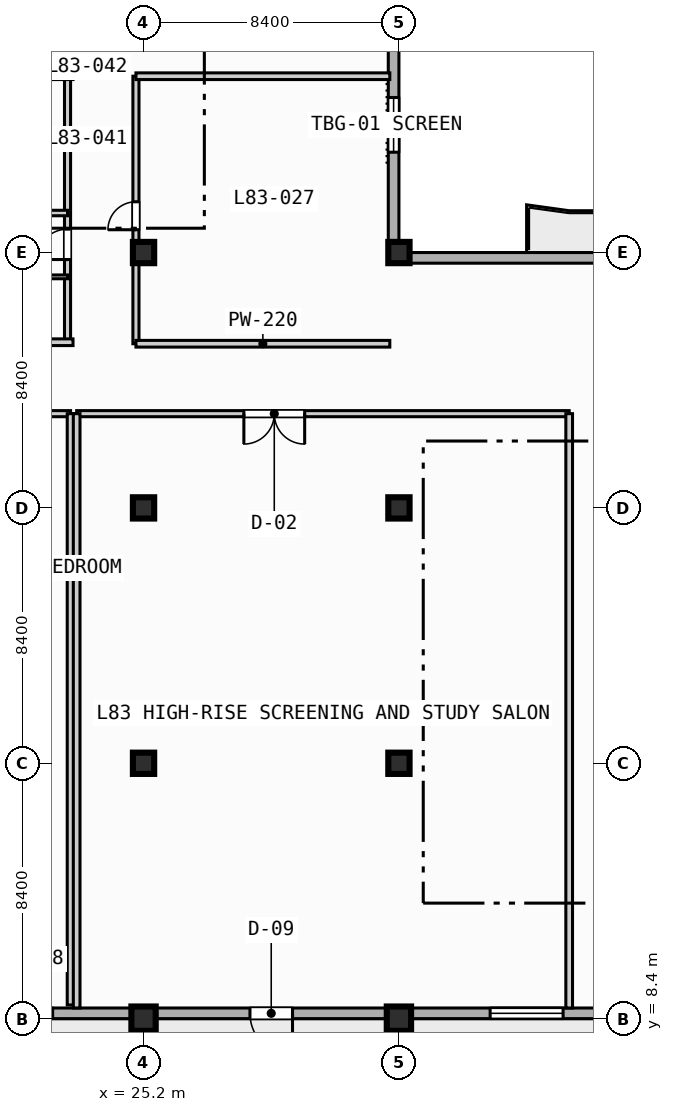
"""IFC4 building model, lengths in metres.
Left out: names, types, materials, properties, quantities, classifications, styles, units other than length and angle.
Written with IfcOpenShell. Run it as: python <this file> out.ifc"""

import sys

from ifc_helpers import new_model, si_unit, direction, frame, frame_2d, origin, origin_2d, place, context, subcontext, project, spatial, rectangle, extrude, element, fill, save


model = new_model("IFC4")
c1 = context("Model", 3, precision=1e-05, world=origin(), true_north=direction((0.0, 1.0)))
c2 = subcontext(c1, "Body", "Model", "MODEL_VIEW")
j1 = project(units=[si_unit("LENGTHUNIT", "METRE"), si_unit("PLANEANGLEUNIT", "RADIAN")], contexts=[c1])
p1 = place(None, origin())
s1 = spatial("IfcSite", under=j1, at=p1, CompositionType="ELEMENT")
p2 = place(p1, origin())
s2 = spatial("IfcBuilding", under=s1, at=p2, CompositionType="ELEMENT")
p3 = place(p2, frame((0.0, 0.0, 335.9)))
s3 = spatial("IfcBuildingStorey", under=s2, at=p3, CompositionType="ELEMENT", Elevation=335.9)
p4 = place(p3, frame((25.2, 8.4, 0.0), z_axis=(0.0, 0.0, 1.0), x_axis=(1.0, 0.0, 0.0)))
e1 = element("IfcColumn", 1, at=p4, inside=s3, PredefinedType="COLUMN", context=c2, shape_type="SweptSolid", body=[
    extrude(rectangle(XDim=0.8, YDim=0.8, at=origin_2d()), origin(), (0.0, 0.0, 1.0), 3.9),
])
for number, where, z_axis, x_axis in (
    (2, (25.2, 16.8, 0.0), (0.0, 0.0, 1.0), (1.0, 0.0, 0.0)),
    (3, (25.2, 25.2, 0.0), (0.0, 0.0, 1.0), (1.0, 0.0, 0.0)),
    (4, (25.2, 33.6, 0.0), (0.0, 0.0, 1.0), (1.0, 0.0, 0.0)),
):
    element("IfcColumn", number, at=place(p3, frame(where, z_axis=z_axis, x_axis=x_axis)), inside=s3, PredefinedType="COLUMN", context=c2, shape_type="SweptSolid", body=[
        extrude(rectangle(XDim=0.7, YDim=0.7, at=origin_2d()), origin(), (0.0, 0.0, 1.0), 3.9),
    ])
p5 = place(p3, frame((33.6, 8.4, 0.0), z_axis=(0.0, 0.0, 1.0), x_axis=(1.0, 0.0, 0.0)))
e5 = element("IfcColumn", 5, at=p5, inside=s3, PredefinedType="COLUMN", context=c2, shape_type="SweptSolid", body=[
    extrude(rectangle(XDim=0.8, YDim=0.8, at=origin_2d()), origin(), (0.0, 0.0, 1.0), 3.9),
])
for number, where, z_axis, x_axis in (
    (6, (33.6, 16.8, 0.0), (0.0, 0.0, 1.0), (1.0, 0.0, 0.0)),
    (7, (33.6, 25.2, 0.0), (0.0, 0.0, 1.0), (1.0, 0.0, 0.0)),
    (8, (33.6, 33.6, 0.0), (0.0, 0.0, 1.0), (1.0, 0.0, 0.0)),
):
    element("IfcColumn", number, at=place(p3, frame(where, z_axis=z_axis, x_axis=x_axis)), inside=s3, PredefinedType="COLUMN", context=c2, shape_type="SweptSolid", body=[
        extrude(rectangle(XDim=0.7, YDim=0.7, at=origin_2d()), origin(), (0.0, 0.0, 1.0), 3.9),
    ])
p6 = place(p3, frame((33.425, 72.425, 0.0), z_axis=(0.0, 0.0, 1.0), x_axis=(0.0, -1.0, 0.0)))
e9 = element("IfcWall", 9, at=p6, inside=s3, PredefinedType="STANDARD", context=c2, shape_type="SweptSolid", body=[
    extrude(rectangle(XDim=39.0, YDim=0.35, at=frame_2d((19.5, 0.0))), origin(), (0.0, 0.0, 1.0), 3.67),
])
p7 = place(p6, frame((33.725, 0.0, 0.85)))
e10 = element("IfcOpeningElement", 10, at=p7, cuts=e9, PredefinedType="OPENING", context=c2, shape_type="SweptSolid", body=[
    extrude(rectangle(XDim=1.8, YDim=1.8, at=frame_2d((0.9, 0.9))), frame((0.0, 0.185, 0.0), z_axis=(0.0, -1.0, 0.0), x_axis=(1.0, 0.0, 0.0)), (0.0, 0.0, 1.0), 0.37),
])
p8 = place(p6, frame((8.225, 0.0, 0.85)))
e11 = element("IfcOpeningElement", 11, at=p8, cuts=e9, PredefinedType="OPENING", context=c2, shape_type="SweptSolid", body=[
    extrude(rectangle(XDim=2.4, YDim=1.95, at=frame_2d((1.2, 0.975))), frame((0.0, 0.185, 0.0), z_axis=(0.0, -1.0, 0.0), x_axis=(1.0, 0.0, 0.0)), (0.0, 0.0, 1.0), 0.37),
])
p9 = place(p3, frame((33.425, 33.425, 0.0), z_axis=(0.0, 0.0, 1.0), x_axis=(1.0, 0.0, 0.0)))
e12 = element("IfcWall", 12, at=p9, inside=s3, PredefinedType="STANDARD", context=c2, shape_type="SweptSolid", body=[
    extrude(rectangle(XDim=30.6, YDim=0.35, at=frame_2d((15.3, 0.0))), origin(), (0.0, 0.0, 1.0), 3.67),
])
p10 = place(p9, frame((12.075, 0.0, 0.0)))
e13 = element("IfcOpeningElement", 13, at=p10, cuts=e12, PredefinedType="OPENING", context=c2, shape_type="SweptSolid", body=[
    extrude(rectangle(XDim=1.4, YDim=2.2, at=frame_2d((0.7, 1.1))), frame((0.0, 0.185, 0.0), z_axis=(0.0, -1.0, 0.0), x_axis=(1.0, 0.0, 0.0)), (0.0, 0.0, 1.0), 0.37),
])
p11 = place(p3, frame((64.025, 8.575, 0.0), z_axis=(0.0, 0.0, 1.0), x_axis=(-1.0, 0.0, 0.0)))
e14 = element("IfcWall", 14, at=p11, inside=s3, PredefinedType="STANDARD", context=c2, shape_type="SweptSolid", body=[
    extrude(rectangle(XDim=52.45, YDim=0.35, at=frame_2d((26.225, 0.0))), origin(), (0.0, 0.0, 1.0), 3.67),
])
p12 = place(p11, frame((33.925, 0.0, 0.0)))
e15 = element("IfcOpeningElement", 15, at=p12, cuts=e14, PredefinedType="OPENING", context=c2, shape_type="SweptSolid", body=[
    extrude(rectangle(XDim=1.4, YDim=2.2, at=frame_2d((0.7, 1.1))), frame((0.0, 0.185, 0.0), z_axis=(0.0, -1.0, 0.0), x_axis=(1.0, 0.0, 0.0)), (0.0, 0.0, 1.0), 0.37),
])
p13 = place(p11, frame((25.025, 0.0, 0.85)))
e16 = element("IfcOpeningElement", 16, at=p13, cuts=e14, PredefinedType="OPENING", context=c2, shape_type="SweptSolid", body=[
    extrude(rectangle(XDim=2.4, YDim=1.95, at=frame_2d((1.2, 0.975))), frame((0.0, 0.185, 0.0), z_axis=(0.0, -1.0, 0.0), x_axis=(1.0, 0.0, 0.0)), (0.0, 0.0, 1.0), 0.37),
])
p14 = place(p11, frame((16.925, 0.0, 0.85)))
e17 = element("IfcOpeningElement", 17, at=p14, cuts=e14, PredefinedType="OPENING", context=c2, shape_type="SweptSolid", body=[
    extrude(rectangle(XDim=1.8, YDim=1.8, at=frame_2d((0.9, 0.9))), frame((0.0, 0.185, 0.0), z_axis=(0.0, -1.0, 0.0), x_axis=(1.0, 0.0, 0.0)), (0.0, 0.0, 1.0), 0.37),
])
p15 = place(p11, frame((41.815, 0.0, 0.85)))
e18 = element("IfcOpeningElement", 18, at=p15, cuts=e14, PredefinedType="OPENING", context=c2, shape_type="SweptSolid", body=[
    extrude(rectangle(XDim=1.8, YDim=1.8, at=frame_2d((0.9, 0.9))), frame((0.0, 0.185, 0.0), z_axis=(0.0, -1.0, 0.0), x_axis=(1.0, 0.0, 0.0)), (0.0, 0.0, 1.0), 0.37),
])
p16 = place(p11, frame((49.535, 0.0, 0.85)))
e19 = element("IfcOpeningElement", 19, at=p16, cuts=e14, PredefinedType="OPENING", context=c2, shape_type="SweptSolid", body=[
    extrude(rectangle(XDim=1.8, YDim=1.8, at=frame_2d((0.9, 0.9))), frame((0.0, 0.185, 0.0), z_axis=(0.0, -1.0, 0.0), x_axis=(1.0, 0.0, 0.0)), (0.0, 0.0, 1.0), 0.37),
])
p17 = place(p3, frame((24.95, 30.6, 0.0), z_axis=(0.0, 0.0, 1.0), x_axis=(0.0, 1.0, 0.0)))
e20 = element("IfcWall", 20, at=p17, inside=s3, PredefinedType="PARTITIONING", context=c2, shape_type="SweptSolid", body=[
    extrude(rectangle(XDim=8.8, YDim=0.2, at=frame_2d((4.4, 0.0))), origin(), (0.0, 0.0, 1.0), 3.07),
])
p18 = place(p17, frame((3.75, 0.0, 0.0)))
e21 = element("IfcOpeningElement", 21, at=p18, cuts=e20, PredefinedType="OPENING", context=c2, shape_type="SweptSolid", body=[
    extrude(rectangle(XDim=0.92, YDim=2.1, at=frame_2d((0.46, 1.05))), frame((0.0, 0.11, 0.0), z_axis=(0.0, -1.0, 0.0), x_axis=(1.0, 0.0, 0.0)), (0.0, 0.0, 1.0), 0.22),
])
for number, where, z_axis, x_axis in (
    (22, (24.95, 30.6, 0.0), (0.0, 0.0, 1.0), (1.0, 0.0, 0.0)),
    (23, (24.95, 39.4, 0.0), (0.0, 0.0, 1.0), (1.0, 0.0, 0.0)),
):
    element("IfcWall", number, at=place(p3, frame(where, z_axis=z_axis, x_axis=x_axis)), inside=s3, PredefinedType="PARTITIONING", context=c2, shape_type="SweptSolid", body=[
        extrude(rectangle(XDim=8.35, YDim=0.22, at=frame_2d((4.175, 0.0))), origin(), (0.0, 0.0, 1.0), 3.67),
    ])
p19 = place(p3, frame((11.8, 28.3, 0.0), z_axis=(0.0, 0.0, 1.0), x_axis=(1.0, 0.0, 0.0)))
e24 = element("IfcWall", 24, at=p19, inside=s3, PredefinedType="PARTITIONING", context=c2, shape_type="SweptSolid", body=[
    extrude(rectangle(XDim=11.0, YDim=0.2, at=frame_2d((5.5, 0.0))), origin(), (0.0, 0.0, 1.0), 3.67),
])
p20 = place(p19, frame((4.05, 0.0, 0.0)))
e25 = element("IfcOpeningElement", 25, at=p20, cuts=e24, PredefinedType="OPENING", context=c2, shape_type="SweptSolid", body=[
    extrude(rectangle(XDim=1.0, YDim=2.15, at=frame_2d((0.5, 1.075))), frame((0.0, 0.11, 0.0), z_axis=(0.0, -1.0, 0.0), x_axis=(1.0, 0.0, 0.0)), (0.0, 0.0, 1.0), 0.22),
])
p21 = place(p3, frame((22.8, 8.85, 0.0), z_axis=(0.0, 0.0, 1.0), x_axis=(0.0, 1.0, 0.0)))
e26 = element("IfcWall", 26, at=p21, inside=s3, PredefinedType="PARTITIONING", context=c2, shape_type="SweptSolid", body=[
    extrude(rectangle(XDim=19.45, YDim=0.22, at=frame_2d((9.725, 0.0))), origin(), (0.0, 0.0, 1.0), 3.67),
])
p22 = place(p3, frame((23.0, 28.3, 0.0), z_axis=(0.0, 0.0, 1.0), x_axis=(1.0, 0.0, 0.0)))
e27 = element("IfcWall", 27, at=p22, inside=s3, PredefinedType="PARTITIONING", context=c2, shape_type="SweptSolid", body=[
    extrude(rectangle(XDim=16.2, YDim=0.2, at=frame_2d((8.1, 0.0))), origin(), (0.0, 0.0, 1.0), 3.67),
])
p23 = place(p22, frame((5.5, 0.0, 0.0)))
e28 = element("IfcOpeningElement", 28, at=p23, cuts=e27, PredefinedType="OPENING", context=c2, shape_type="SweptSolid", body=[
    extrude(rectangle(XDim=2.0, YDim=2.15, at=frame_2d((1.0, 1.075))), frame((0.0, 0.11, 0.0), z_axis=(0.0, -1.0, 0.0), x_axis=(1.0, 0.0, 0.0)), (0.0, 0.0, 1.0), 0.22),
])
for number, where, z_axis, x_axis in (
    (29, (23.0, 8.75, 0.0), (0.0, 0.0, 1.0), (0.0, 1.0, 0.0)),
    (30, (39.2, 8.75, 0.0), (0.0, 0.0, 1.0), (0.0, 1.0, 0.0)),
):
    element("IfcWall", number, at=place(p3, frame(where, z_axis=z_axis, x_axis=x_axis)), inside=s3, PredefinedType="PARTITIONING", context=c2, shape_type="SweptSolid", body=[
        extrude(rectangle(XDim=19.55, YDim=0.22, at=frame_2d((9.775, 0.0))), origin(), (0.0, 0.0, 1.0), 3.67),
    ])
p24 = place(p3, frame((22.7, 30.65, 0.0), z_axis=(0.0, 0.0, 1.0), x_axis=(0.0, 1.0, 0.0)))
e31 = element("IfcWall", 31, at=p24, inside=s3, PredefinedType="PARTITIONING", context=c2, shape_type="SweptSolid", body=[
    extrude(rectangle(XDim=8.75, YDim=0.2, at=frame_2d((4.375, 0.0))), origin(), (0.0, 0.0, 1.0), 3.67),
])
p25 = place(p24, frame((2.72, 0.0, 0.0)))
e32 = element("IfcOpeningElement", 32, at=p25, cuts=e31, PredefinedType="OPENING", context=c2, shape_type="SweptSolid", body=[
    extrude(rectangle(XDim=1.0, YDim=2.15, at=frame_2d((0.5, 1.075))), frame((0.0, 0.11, 0.0), z_axis=(0.0, -1.0, 0.0), x_axis=(1.0, 0.0, 0.0)), (0.0, 0.0, 1.0), 0.22),
])
for number, where, z_axis, x_axis in (
    (33, (8.6, 30.65, 0.0), (0.0, 0.0, 1.0), (1.0, 0.0, 0.0)),
    (34, (8.6, 39.4, 0.0), (0.0, 0.0, 1.0), (1.0, 0.0, 0.0)),
):
    element("IfcWall", number, at=place(p3, frame(where, z_axis=z_axis, x_axis=x_axis)), inside=s3, PredefinedType="PARTITIONING", context=c2, shape_type="SweptSolid", body=[
        extrude(rectangle(XDim=14.28, YDim=0.22, at=frame_2d((7.14, 0.0))), origin(), (0.0, 0.0, 1.0), 3.67),
    ])
for number, where, z_axis, x_axis in (
    (35, (20.25, 34.9, 0.0), (0.0, 0.0, 1.0), (1.0, 0.0, 0.0)),
    (36, (20.25, 37.06, 0.0), (0.0, 0.0, 1.0), (1.0, 0.0, 0.0)),
):
    element("IfcWall", number, at=place(p3, frame(where, z_axis=z_axis, x_axis=x_axis)), inside=s3, PredefinedType="PLUMBINGWALL", context=c2, shape_type="SweptSolid", body=[
        extrude(rectangle(XDim=2.45, YDim=0.18, at=frame_2d((1.225, 0.0))), origin(), (0.0, 0.0, 1.0), 3.67),
    ])
p26 = place(p3, frame((8.75, 32.8, 0.0), z_axis=(0.0, 0.0, 1.0), x_axis=(1.0, 0.0, 0.0)))
e37 = element("IfcWall", 37, at=p26, inside=s3, PredefinedType="PARTITIONING", context=c2, shape_type="SweptSolid", body=[
    extrude(rectangle(XDim=13.95, YDim=0.125, at=frame_2d((6.975, 0.0))), origin(), (0.0, 0.0, 1.0), 3.67),
])
p27 = place(p26, frame((5.29, 0.0, 0.0)))
e38 = element("IfcOpeningElement", 38, at=p27, cuts=e37, PredefinedType="OPENING", context=c2, shape_type="SweptSolid", body=[
    extrude(rectangle(XDim=0.92, YDim=2.1, at=frame_2d((0.46, 1.05))), frame((0.0, 0.073, 0.0), z_axis=(0.0, -1.0, 0.0), x_axis=(1.0, 0.0, 0.0)), (0.0, 0.0, 1.0), 0.145),
])
p28 = place(p7, origin())
e39 = element("IfcWindow", 39, at=p28, inside=s3, PartitioningType="SINGLE_PANEL", PredefinedType="WINDOW", context=c2, shape_type="SweptSolid", body=[
    extrude(rectangle(XDim=1.8, YDim=1.8, at=frame_2d((0.9, 0.9))), frame((0.0, 0.03, 0.0), z_axis=(0.0, -1.0, 0.0), x_axis=(1.0, 0.0, 0.0)), (0.0, 0.0, 1.0), 0.06),
])
fill(e10, e39)
p29 = place(p12, origin())
e40 = element("IfcDoor", 40, at=p29, inside=s3, OperationType="SINGLE_SWING_LEFT", PredefinedType="DOOR", context=c2, shape_type="SweptSolid", body=[
    extrude(rectangle(XDim=1.4, YDim=2.2, at=frame_2d((0.7, 1.1))), frame((0.0, 0.025, 0.0), z_axis=(0.0, -1.0, 0.0), x_axis=(1.0, 0.0, 0.0)), (0.0, 0.0, 1.0), 0.05),
])
fill(e15, e40)
p30 = place(p13, origin())
e41 = element("IfcWindow", 41, at=p30, inside=s3, PartitioningType="SINGLE_PANEL", PredefinedType="WINDOW", context=c2, shape_type="SweptSolid", body=[
    extrude(rectangle(XDim=2.4, YDim=1.95, at=frame_2d((1.2, 0.975))), frame((0.0, 0.03, 0.0), z_axis=(0.0, -1.0, 0.0), x_axis=(1.0, 0.0, 0.0)), (0.0, 0.0, 1.0), 0.06),
])
fill(e16, e41)
p31 = place(p15, origin())
e42 = element("IfcWindow", 42, at=p31, inside=s3, PartitioningType="SINGLE_PANEL", PredefinedType="WINDOW", context=c2, shape_type="SweptSolid", body=[
    extrude(rectangle(XDim=1.8, YDim=1.8, at=frame_2d((0.9, 0.9))), frame((0.0, 0.03, 0.0), z_axis=(0.0, -1.0, 0.0), x_axis=(1.0, 0.0, 0.0)), (0.0, 0.0, 1.0), 0.06),
])
fill(e18, e42)
p32 = place(p18, origin())
e43 = element("IfcDoor", 43, at=p32, inside=s3, OperationType="SINGLE_SWING_LEFT", PredefinedType="DOOR", context=c2, shape_type="SweptSolid", body=[
    extrude(rectangle(XDim=0.92, YDim=2.1, at=frame_2d((0.46, 1.05))), frame((0.0, 0.025, 0.0), z_axis=(0.0, -1.0, 0.0), x_axis=(1.0, 0.0, 0.0)), (0.0, 0.0, 1.0), 0.05),
])
fill(e21, e43)
p33 = place(p23, origin())
e44 = element("IfcDoor", 44, at=p33, inside=s3, OperationType="SINGLE_SWING_RIGHT", PredefinedType="DOOR", context=c2, shape_type="SweptSolid", body=[
    extrude(rectangle(XDim=2.0, YDim=2.15, at=frame_2d((1.0, 1.075))), frame((0.0, 0.025, 0.0), z_axis=(0.0, -1.0, 0.0), x_axis=(1.0, 0.0, 0.0)), (0.0, 0.0, 1.0), 0.05),
])
fill(e28, e44)
p34 = place(p25, origin())
e45 = element("IfcDoor", 45, at=p34, inside=s3, OperationType="SINGLE_SWING_LEFT", PredefinedType="DOOR", context=c2, shape_type="SweptSolid", body=[
    extrude(rectangle(XDim=1.0, YDim=2.15, at=frame_2d((0.5, 1.075))), frame((0.0, 0.025, 0.0), z_axis=(0.0, -1.0, 0.0), x_axis=(1.0, 0.0, 0.0)), (0.0, 0.0, 1.0), 0.05),
])
fill(e32, e45)
save(model, sys.argv[1])
